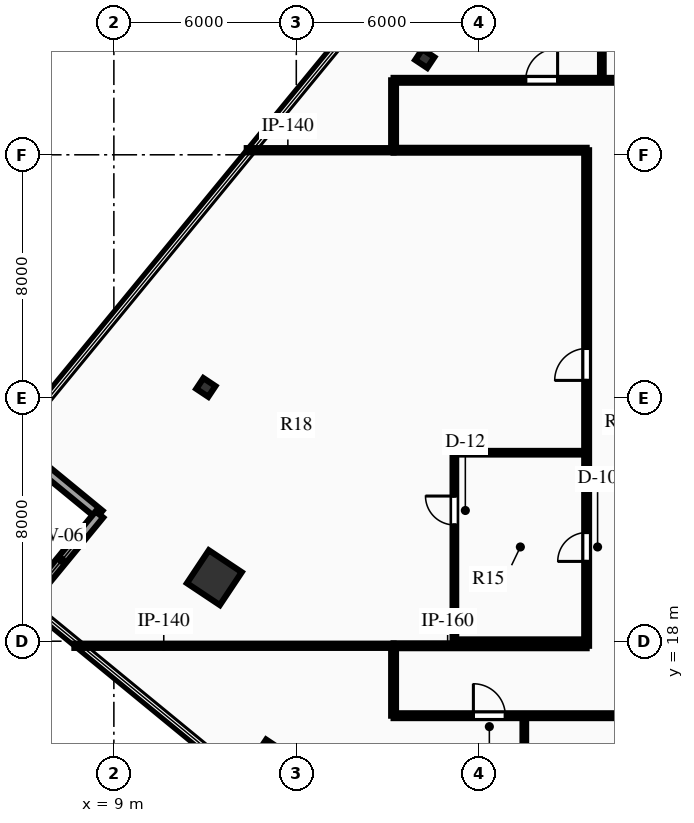
"""IFC4 building model, lengths in metres.
Left out: names, types, materials, properties, quantities, classifications, styles, units other than length and angle.
Written with IfcOpenShell. Run it as: python <this file> out.ifc"""

import sys

from ifc_helpers import new_model, si_unit, direction, frame, frame_2d, origin, origin_2d, place, context, subcontext, project, spatial, rectangle, hollow_rectangle, i_section, extrude, element, fill, save


model = new_model("IFC4")
c1 = context("Model", 3, precision=1e-05, world=origin(), true_north=direction((0.0, 1.0)))
c2 = subcontext(c1, "Body", "Model", "MODEL_VIEW")
j1 = project(units=[si_unit("LENGTHUNIT", "METRE"), si_unit("PLANEANGLEUNIT", "RADIAN")], contexts=[c1])
p1 = place(None, origin())
s1 = spatial("IfcSite", under=j1, at=p1, CompositionType="ELEMENT")
p2 = place(p1, origin())
s2 = spatial("IfcBuilding", under=s1, at=p2, CompositionType="ELEMENT")
p3 = place(p2, frame((0.0, 0.0, 198.45)))
s3 = spatial("IfcBuildingStorey", under=s2, at=p3, CompositionType="ELEMENT", Elevation=198.45)
p4 = place(p3, frame((12.305, 20.09, 0.0), z_axis=(0.0, 0.0, 1.0), x_axis=(0.554118199338, 0.832437998389, 0.0)))
e1 = element("IfcColumn", 1, at=p4, inside=s3, PredefinedType="COLUMN", context=c2, shape_type="SweptSolid", body=[
    extrude(hollow_rectangle(XDim=1.3, YDim=1.3, WallThickness=0.06, at=origin_2d()), origin(), (0.0, 0.0, 1.0), 3.75),
])
for number, where, z_axis, x_axis in (
    (2, (19.226, 37.166, 0.0), (0.0, 0.0, 1.0), (0.554, 0.832, 0.0)),
    (3, (12.025, 26.347, 0.0), (0.0, 0.0, 1.0), (0.554, 0.832, 0.0)),
    (4, (14.088, 14.458, 0.0), (0.0, 0.0, 1.0), (0.554, 0.832, 0.0)),
):
    element("IfcColumn", number, at=place(p3, frame(where, z_axis=z_axis, x_axis=x_axis)), inside=s3, PredefinedType="COLUMN", context=c2, shape_type="SweptSolid", body=[
        extrude(i_section(OverallWidth=0.424, OverallDepth=0.474, WebThickness=0.048, FlangeThickness=0.077, at=origin_2d()), origin(), (0.0, 0.0, 1.0), 3.75),
    ])
p5 = place(p3, frame((8.524, 22.169, 0.0), z_axis=(0.0, 0.0, 1.0), x_axis=(-0.77274818591, 0.634712723343, 0.0)))
e5 = element("IfcWall", 5, at=p5, inside=s3, PredefinedType="STANDARD", context=c2, shape_type="SweptSolid", body=[
    extrude(rectangle(XDim=3.9, YDim=0.32, at=frame_2d((1.95, 0.0))), origin(), (0.0, 0.0, 1.0), 3.47),
])
p6 = place(p3, frame((6.049, 19.156, 0.0), z_axis=(0.0, 0.0, 1.0), x_axis=(0.63475010273, 0.772717482062, 0.0)))
e6 = element("IfcWall", 6, at=p6, inside=s3, PredefinedType="STANDARD", context=c2, shape_type="SweptSolid", body=[
    extrude(rectangle(XDim=3.9, YDim=0.32, at=frame_2d((1.95, 0.0))), origin(), (0.0, 0.0, 1.0), 3.47),
])
p7 = place(p6, frame((1.25, 0.0, 0.85)))
e7 = element("IfcOpeningElement", 7, at=p7, cuts=e6, PredefinedType="OPENING", context=c2, shape_type="SweptSolid", body=[
    extrude(rectangle(XDim=1.4, YDim=2.0, at=frame_2d((0.7, 1.0))), frame((0.0, 0.17, 0.0), z_axis=(0.0, -1.0, 0.0), x_axis=(1.0, 0.0, 0.0)), (0.0, 0.0, 1.0), 0.34),
])
p8 = place(p3, frame((18.2, 15.55, 0.0), z_axis=(0.0, 0.0, 1.0), x_axis=(1.0, 0.0, 0.0)))
e8 = element("IfcWall", 8, at=p8, inside=s3, PredefinedType="PARTITIONING", context=c2, shape_type="SweptSolid", body=[
    extrude(rectangle(XDim=35.6, YDim=0.16, at=frame_2d((17.8, 0.0))), origin(), (0.0, 0.0, 1.0), 2.849),
])
p9 = place(p8, frame((2.625, 0.0, 0.0)))
e9 = element("IfcOpeningElement", 9, at=p9, cuts=e8, PredefinedType="OPENING", context=c2, shape_type="SweptSolid", body=[
    extrude(rectangle(XDim=1.05, YDim=2.15, at=frame_2d((0.525, 1.075))), frame((0.0, 0.09, 0.0), z_axis=(0.0, -1.0, 0.0), x_axis=(1.0, 0.0, 0.0)), (0.0, 0.0, 1.0), 0.18),
])
p10 = place(p8, frame((9.335, 0.0, 0.0)))
e10 = element("IfcOpeningElement", 10, at=p10, cuts=e8, PredefinedType="OPENING", context=c2, shape_type="SweptSolid", body=[
    extrude(rectangle(XDim=1.05, YDim=2.15, at=frame_2d((0.525, 1.075))), frame((0.0, 0.09, 0.0), z_axis=(0.0, -1.0, 0.0), x_axis=(1.0, 0.0, 0.0)), (0.0, 0.0, 1.0), 0.18),
])
p11 = place(p8, frame((17.775, 0.0, 0.0)))
e11 = element("IfcOpeningElement", 11, at=p11, cuts=e8, PredefinedType="OPENING", context=c2, shape_type="SweptSolid", body=[
    extrude(rectangle(XDim=1.05, YDim=2.15, at=frame_2d((0.525, 1.075))), frame((0.0, 0.09, 0.0), z_axis=(0.0, -1.0, 0.0), x_axis=(1.0, 0.0, 0.0)), (0.0, 0.0, 1.0), 0.18),
])
p12 = place(p8, frame((26.055, 0.0, 0.0)))
e12 = element("IfcOpeningElement", 12, at=p12, cuts=e8, PredefinedType="OPENING", context=c2, shape_type="SweptSolid", body=[
    extrude(rectangle(XDim=1.05, YDim=2.15, at=frame_2d((0.525, 1.075))), frame((0.0, 0.09, 0.0), z_axis=(0.0, -1.0, 0.0), x_axis=(1.0, 0.0, 0.0)), (0.0, 0.0, 1.0), 0.18),
])
p13 = place(p8, frame((32.265, 0.0, 0.0)))
e13 = element("IfcOpeningElement", 13, at=p13, cuts=e8, PredefinedType="OPENING", context=c2, shape_type="SweptSolid", body=[
    extrude(rectangle(XDim=1.05, YDim=2.15, at=frame_2d((0.525, 1.075))), frame((0.0, 0.09, 0.0), z_axis=(0.0, -1.0, 0.0), x_axis=(1.0, 0.0, 0.0)), (0.0, 0.0, 1.0), 0.18),
])
p14 = place(p3, frame((18.2, 17.85, 0.0), z_axis=(0.0, 0.0, 1.0), x_axis=(1.0, 0.0, 0.0)))
e14 = element("IfcWall", 14, at=p14, inside=s3, PredefinedType="PARTITIONING", context=c2, shape_type="SweptSolid", body=[
    extrude(rectangle(XDim=6.35, YDim=0.16, at=frame_2d((3.175, 0.0))), origin(), (0.0, 0.0, 1.0), 3.47),
])
p15 = place(p3, frame((18.2, 36.45, 0.0), z_axis=(0.0, 0.0, 1.0), x_axis=(1.0, 0.0, 0.0)))
e15 = element("IfcWall", 15, at=p15, inside=s3, PredefinedType="PARTITIONING", context=c2, shape_type="SweptSolid", body=[
    extrude(rectangle(XDim=35.6, YDim=0.16, at=frame_2d((17.8, 0.0))), origin(), (0.0, 0.0, 1.0), 2.849),
])
p16 = place(p15, frame((7.55, 0.0, 0.0)))
e16 = element("IfcOpeningElement", 16, at=p16, cuts=e15, PredefinedType="OPENING", context=c2, shape_type="SweptSolid", body=[
    extrude(rectangle(XDim=0.9, YDim=2.15, at=frame_2d((0.45, 1.075))), frame((0.0, 0.09, 0.0), z_axis=(0.0, -1.0, 0.0), x_axis=(1.0, 0.0, 0.0)), (0.0, 0.0, 1.0), 0.18),
])
p17 = place(p15, frame((9.85, 0.0, 0.0)))
e17 = element("IfcOpeningElement", 17, at=p17, cuts=e15, PredefinedType="OPENING", context=c2, shape_type="SweptSolid", body=[
    extrude(rectangle(XDim=0.9, YDim=2.15, at=frame_2d((0.45, 1.075))), frame((0.0, 0.09, 0.0), z_axis=(0.0, -1.0, 0.0), x_axis=(1.0, 0.0, 0.0)), (0.0, 0.0, 1.0), 0.18),
])
p18 = place(p15, frame((12.1, 0.0, 0.0)))
e18 = element("IfcOpeningElement", 18, at=p18, cuts=e15, PredefinedType="OPENING", context=c2, shape_type="SweptSolid", body=[
    extrude(rectangle(XDim=1.0, YDim=2.15, at=frame_2d((0.5, 1.075))), frame((0.0, 0.09, 0.0), z_axis=(0.0, -1.0, 0.0), x_axis=(1.0, 0.0, 0.0)), (0.0, 0.0, 1.0), 0.18),
])
p19 = place(p15, frame((4.345, 0.0, 0.0)))
e19 = element("IfcOpeningElement", 19, at=p19, cuts=e15, PredefinedType="OPENING", context=c2, shape_type="SweptSolid", body=[
    extrude(rectangle(XDim=1.05, YDim=2.15, at=frame_2d((0.525, 1.075))), frame((0.0, 0.09, 0.0), z_axis=(0.0, -1.0, 0.0), x_axis=(1.0, 0.0, 0.0)), (0.0, 0.0, 1.0), 0.18),
])
p20 = place(p15, frame((18.049, 0.0, 0.0)))
e20 = element("IfcOpeningElement", 20, at=p20, cuts=e15, PredefinedType="OPENING", context=c2, shape_type="SweptSolid", body=[
    extrude(rectangle(XDim=1.05, YDim=2.15, at=frame_2d((0.525, 1.075))), frame((0.0, 0.09, 0.0), z_axis=(0.0, -1.0, 0.0), x_axis=(1.0, 0.0, 0.0)), (0.0, 0.0, 1.0), 0.18),
])
p21 = place(p15, frame((31.833, 0.0, 0.0)))
e21 = element("IfcOpeningElement", 21, at=p21, cuts=e15, PredefinedType="OPENING", context=c2, shape_type="SweptSolid", body=[
    extrude(rectangle(XDim=1.05, YDim=2.15, at=frame_2d((0.525, 1.075))), frame((0.0, 0.09, 0.0), z_axis=(0.0, -1.0, 0.0), x_axis=(1.0, 0.0, 0.0)), (0.0, 0.0, 1.0), 0.18),
])
p22 = place(p3, frame((18.2, 34.15, 0.0), z_axis=(0.0, 0.0, 1.0), x_axis=(1.0, 0.0, 0.0)))
e22 = element("IfcWall", 22, at=p22, inside=s3, PredefinedType="PARTITIONING", context=c2, shape_type="SweptSolid", body=[
    extrude(rectangle(XDim=6.35, YDim=0.16, at=frame_2d((3.175, 0.0))), origin(), (0.0, 0.0, 1.0), 3.47),
])
p23 = place(p3, frame((24.55, 17.85, 0.0), z_axis=(0.0, 0.0, 1.0), x_axis=(0.0, 1.0, 0.0)))
e23 = element("IfcWall", 23, at=p23, inside=s3, PredefinedType="PARTITIONING", context=c2, shape_type="SweptSolid", body=[
    extrude(rectangle(XDim=16.3, YDim=0.16, at=frame_2d((8.15, 0.0))), origin(), (0.0, 0.0, 1.0), 3.47),
])
p24 = place(p23, frame((2.775, 0.0, 0.0)))
e24 = element("IfcOpeningElement", 24, at=p24, cuts=e23, PredefinedType="OPENING", context=c2, shape_type="SweptSolid", body=[
    extrude(rectangle(XDim=0.95, YDim=2.15, at=frame_2d((0.475, 1.075))), frame((0.0, 0.09, 0.0), z_axis=(0.0, -1.0, 0.0), x_axis=(1.0, 0.0, 0.0)), (0.0, 0.0, 1.0), 0.18),
])
p25 = place(p23, frame((8.729, 0.0, 0.0)))
e25 = element("IfcOpeningElement", 25, at=p25, cuts=e23, PredefinedType="OPENING", context=c2, shape_type="SweptSolid", body=[
    extrude(rectangle(XDim=1.05, YDim=2.15, at=frame_2d((0.525, 1.075))), frame((0.0, 0.09, 0.0), z_axis=(0.0, -1.0, 0.0), x_axis=(1.0, 0.0, 0.0)), (0.0, 0.0, 1.0), 0.18),
])
for number, where, z_axis, x_axis in (
    (26, (18.2, 15.55, 0.0), (0.0, 0.0, 1.0), (0.0, 1.0, 0.0)),
    (27, (18.2, 34.15, 0.0), (0.0, 0.0, 1.0), (0.0, 1.0, 0.0)),
):
    element("IfcWall", number, at=place(p3, frame(where, z_axis=z_axis, x_axis=x_axis)), inside=s3, PredefinedType="PARTITIONING", context=c2, shape_type="SweptSolid", body=[
        extrude(rectangle(XDim=2.3, YDim=0.16, at=frame_2d((1.15, 0.0))), origin(), (0.0, 0.0, 1.0), 3.47),
    ])
p26 = place(p3, frame((25.05, 36.45, 0.0), z_axis=(0.0, 0.0, 1.0), x_axis=(0.0, 1.0, 0.0)))
e28 = element("IfcWall", 28, at=p26, inside=s3, PredefinedType="PARTITIONING", context=c2, shape_type="SweptSolid", body=[
    extrude(rectangle(XDim=3.9, YDim=0.12, at=frame_2d((1.95, 0.0))), origin(), (0.0, 0.0, 1.0), 3.47),
])
p27 = place(p3, frame((7.701, 17.85, 0.0), z_axis=(0.0, 0.0, 1.0), x_axis=(1.0, 0.0, 0.0)))
e29 = element("IfcWall", 29, at=p27, inside=s3, PredefinedType="PARTITIONING", context=c2, shape_type="SweptSolid", body=[
    extrude(rectangle(XDim=10.499, YDim=0.14, at=frame_2d((5.25, 0.0))), origin(), (0.0, 0.0, 1.0), 3.47),
])
p28 = place(p3, frame((13.37, 34.15, 0.0), z_axis=(0.0, 0.0, 1.0), x_axis=(1.0, 0.0, 0.0)))
e30 = element("IfcWall", 30, at=p28, inside=s3, PredefinedType="PARTITIONING", context=c2, shape_type="SweptSolid", body=[
    extrude(rectangle(XDim=4.83, YDim=0.14, at=frame_2d((2.415, 0.0))), origin(), (0.0, 0.0, 1.0), 3.47),
])
p29 = place(p3, frame((22.5, 5.694, 0.0), z_axis=(0.0, 0.0, 1.0), x_axis=(0.0, 1.0, 0.0)))
e31 = element("IfcWall", 31, at=p29, inside=s3, PredefinedType="PARTITIONING", context=c2, shape_type="SweptSolid", body=[
    extrude(rectangle(XDim=9.856, YDim=0.12, at=frame_2d((4.928, 0.0))), origin(), (0.0, 0.0, 1.0), 3.47),
])
p30 = place(p3, frame((20.2, 18.0, 0.0), z_axis=(0.0, 0.0, 1.0), x_axis=(1.0, 0.0, 0.0)))
e32 = element("IfcWall", 32, at=p30, inside=s3, PredefinedType="PARTITIONING", context=c2, shape_type="SweptSolid", body=[
    extrude(rectangle(XDim=4.35, YDim=0.12, at=frame_2d((2.175, 0.0))), origin(), (0.0, 0.0, 1.0), 3.47),
])
p31 = place(p3, frame((20.2, 18.0, 0.0), z_axis=(0.0, 0.0, 1.0), x_axis=(0.0, 1.0, 0.0)))
e33 = element("IfcWall", 33, at=p31, inside=s3, PredefinedType="PARTITIONING", context=c2, shape_type="SweptSolid", body=[
    extrude(rectangle(XDim=6.2, YDim=0.12, at=frame_2d((3.1, 0.0))), origin(), (0.0, 0.0, 1.0), 3.47),
])
p32 = place(p31, frame((3.825, 0.0, 0.0)))
e34 = element("IfcOpeningElement", 34, at=p32, cuts=e33, PredefinedType="OPENING", context=c2, shape_type="SweptSolid", body=[
    extrude(rectangle(XDim=0.95, YDim=2.15, at=frame_2d((0.475, 1.075))), frame((0.0, 0.07, 0.0), z_axis=(0.0, -1.0, 0.0), x_axis=(1.0, 0.0, 0.0)), (0.0, 0.0, 1.0), 0.14),
])
p33 = place(p3, frame((20.2, 24.2, 0.0), z_axis=(0.0, 0.0, 1.0), x_axis=(1.0, 0.0, 0.0)))
e35 = element("IfcWall", 35, at=p33, inside=s3, PredefinedType="PARTITIONING", context=c2, shape_type="SweptSolid", body=[
    extrude(rectangle(XDim=4.35, YDim=0.12, at=frame_2d((2.175, 0.0))), origin(), (0.0, 0.0, 1.0), 3.47),
])
p34 = place(p7, origin())
e36 = element("IfcWindow", 36, at=p34, inside=s3, PartitioningType="SINGLE_PANEL", PredefinedType="WINDOW", context=c2, shape_type="SweptSolid", body=[
    extrude(rectangle(XDim=1.4, YDim=2.0, at=frame_2d((0.7, 1.0))), frame((0.0, 0.03, 0.0), z_axis=(0.0, -1.0, 0.0), x_axis=(1.0, 0.0, 0.0)), (0.0, 0.0, 1.0), 0.06),
])
fill(e7, e36)
p35 = place(p24, origin())
e37 = element("IfcDoor", 37, at=p35, inside=s3, OperationType="SINGLE_SWING_LEFT", PredefinedType="DOOR", context=c2, shape_type="SweptSolid", body=[
    extrude(rectangle(XDim=0.95, YDim=2.15, at=frame_2d((0.475, 1.075))), frame((0.0, 0.025, 0.0), z_axis=(0.0, -1.0, 0.0), x_axis=(1.0, 0.0, 0.0)), (0.0, 0.0, 1.0), 0.05),
])
fill(e24, e37)
p36 = place(p32, origin())
e38 = element("IfcDoor", 38, at=p36, inside=s3, OperationType="SINGLE_SWING_RIGHT", PredefinedType="DOOR", context=c2, shape_type="SweptSolid", body=[
    extrude(rectangle(XDim=0.95, YDim=2.15, at=frame_2d((0.475, 1.075))), frame((0.0, 0.025, 0.0), z_axis=(0.0, -1.0, 0.0), x_axis=(1.0, 0.0, 0.0)), (0.0, 0.0, 1.0), 0.05),
])
fill(e34, e38)
p37 = place(p9, origin())
e39 = element("IfcDoor", 39, at=p37, inside=s3, OperationType="SINGLE_SWING_LEFT", PredefinedType="DOOR", context=c2, shape_type="SweptSolid", body=[
    extrude(rectangle(XDim=1.05, YDim=2.15, at=frame_2d((0.525, 1.075))), frame((0.0, 0.025, 0.0), z_axis=(0.0, -1.0, 0.0), x_axis=(1.0, 0.0, 0.0)), (0.0, 0.0, 1.0), 0.05),
])
fill(e9, e39)
p38 = place(p19, origin())
e40 = element("IfcDoor", 40, at=p38, inside=s3, OperationType="SINGLE_SWING_RIGHT", PredefinedType="DOOR", context=c2, shape_type="SweptSolid", body=[
    extrude(rectangle(XDim=1.05, YDim=2.15, at=frame_2d((0.525, 1.075))), frame((0.0, 0.025, 0.0), z_axis=(0.0, -1.0, 0.0), x_axis=(1.0, 0.0, 0.0)), (0.0, 0.0, 1.0), 0.05),
])
fill(e19, e40)
p39 = place(p25, origin())
e41 = element("IfcDoor", 41, at=p39, inside=s3, OperationType="SINGLE_SWING_LEFT", PredefinedType="DOOR", context=c2, shape_type="SweptSolid", body=[
    extrude(rectangle(XDim=1.05, YDim=2.15, at=frame_2d((0.525, 1.075))), frame((0.0, 0.025, 0.0), z_axis=(0.0, -1.0, 0.0), x_axis=(1.0, 0.0, 0.0)), (0.0, 0.0, 1.0), 0.05),
])
fill(e25, e41)
save(model, sys.argv[1])
